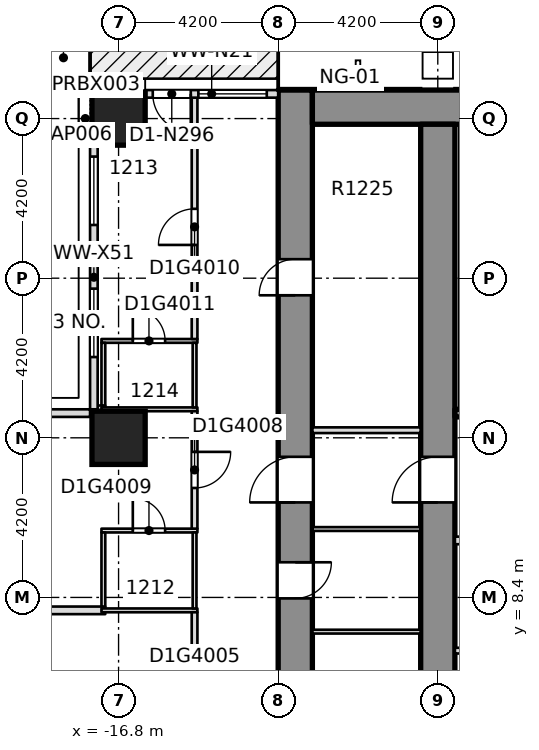
"""IFC4 building model, lengths in metres.
Left out: names, types, materials, properties, quantities, classifications, styles, units other than length and angle.
Written with IfcOpenShell. Run it as: python <this file> out.ifc"""

import sys

from ifc_helpers import new_model, si_unit, direction, frame, frame_2d, origin, origin_2d, place, context, subcontext, project, spatial, rectangle, extrude, element, fill, save


model = new_model("IFC4")
c1 = context("Model", 3, precision=1e-05, world=origin(), true_north=direction((0.0, 1.0)))
c2 = subcontext(c1, "Body", "Model", "MODEL_VIEW")
j1 = project(units=[si_unit("LENGTHUNIT", "METRE"), si_unit("PLANEANGLEUNIT", "RADIAN")], contexts=[c1])
p1 = place(None, origin())
s1 = spatial("IfcSite", under=j1, at=p1, CompositionType="ELEMENT")
p2 = place(p1, origin())
s2 = spatial("IfcBuilding", under=s1, at=p2, CompositionType="ELEMENT")
p3 = place(p2, frame((0.0, 0.0, 55.2)))
s3 = spatial("IfcBuildingStorey", under=s2, at=p3, CompositionType="ELEMENT", Elevation=55.2)
p4 = place(p3, frame((-12.15, -8.4, -0.32), z_axis=(0.0, 0.0, 1.0), x_axis=(0.0, 1.0, 0.0)))
e1 = element("IfcWall", 1, at=p4, inside=s3, PredefinedType="SHEAR", context=c2, shape_type="SweptSolid", body=[
    extrude(rectangle(XDim=30.15, YDim=0.9, at=frame_2d((15.075, 0.0))), origin(), (0.0, 0.0, 1.0), 3.45),
])
p5 = place(p4, frame((2.875, 0.0, 0.32)))
e2 = element("IfcOpeningElement", 2, at=p5, cuts=e1, PredefinedType="OPENING", context=c2, shape_type="SweptSolid", body=[
    extrude(rectangle(XDim=0.95, YDim=2.1, at=frame_2d((0.475, 1.05))), frame((0.0, 0.46, 0.0), z_axis=(0.0, -1.0, 0.0), x_axis=(1.0, 0.0, 0.0)), (0.0, 0.0, 1.0), 0.92),
])
p6 = place(p4, frame((6.575, 0.0, 0.32)))
e3 = element("IfcOpeningElement", 3, at=p6, cuts=e1, PredefinedType="OPENING", context=c2, shape_type="SweptSolid", body=[
    extrude(rectangle(XDim=0.95, YDim=2.1, at=frame_2d((0.475, 1.05))), frame((0.0, 0.46, 0.0), z_axis=(0.0, -1.0, 0.0), x_axis=(1.0, 0.0, 0.0)), (0.0, 0.0, 1.0), 0.92),
])
p7 = place(p4, frame((9.425, 0.0, 0.32)))
e4 = element("IfcOpeningElement", 4, at=p7, cuts=e1, PredefinedType="OPENING", context=c2, shape_type="SweptSolid", body=[
    extrude(rectangle(XDim=0.95, YDim=2.1, at=frame_2d((0.475, 1.05))), frame((0.0, 0.46, 0.0), z_axis=(0.0, -1.0, 0.0), x_axis=(1.0, 0.0, 0.0)), (0.0, 0.0, 1.0), 0.92),
])
p8 = place(p4, frame((13.225, 0.0, 0.32)))
e5 = element("IfcOpeningElement", 5, at=p8, cuts=e1, PredefinedType="OPENING", context=c2, shape_type="SweptSolid", body=[
    extrude(rectangle(XDim=0.95, YDim=2.1, at=frame_2d((0.475, 1.05))), frame((0.0, 0.46, 0.0), z_axis=(0.0, -1.0, 0.0), x_axis=(1.0, 0.0, 0.0)), (0.0, 0.0, 1.0), 0.92),
])
p9 = place(p4, frame((16.775, 0.0, 0.32)))
e6 = element("IfcOpeningElement", 6, at=p9, cuts=e1, PredefinedType="OPENING", context=c2, shape_type="SweptSolid", body=[
    extrude(rectangle(XDim=0.95, YDim=2.1, at=frame_2d((0.475, 1.05))), frame((0.0, 0.46, 0.0), z_axis=(0.0, -1.0, 0.0), x_axis=(1.0, 0.0, 0.0)), (0.0, 0.0, 1.0), 0.92),
])
p10 = place(p4, frame((24.75, 0.0, 0.32)))
e7 = element("IfcOpeningElement", 7, at=p10, cuts=e1, PredefinedType="OPENING", context=c2, shape_type="SweptSolid", body=[
    extrude(rectangle(XDim=0.95, YDim=2.1, at=frame_2d((0.475, 1.05))), frame((0.0, 0.46, 0.0), z_axis=(0.0, -1.0, 0.0), x_axis=(1.0, 0.0, 0.0)), (0.0, 0.0, 1.0), 0.92),
])
p11 = place(p4, frame((19.3, 0.0, 0.32)))
e8 = element("IfcOpeningElement", 8, at=p11, cuts=e1, PredefinedType="OPENING", context=c2, shape_type="SweptSolid", body=[
    extrude(rectangle(XDim=1.2, YDim=2.1, at=frame_2d((0.6, 1.05))), frame((0.0, 0.46, 0.0), z_axis=(0.0, -1.0, 0.0), x_axis=(1.0, 0.0, 0.0)), (0.0, 0.0, 1.0), 0.92),
])
p12 = place(p3, frame((-11.7, 21.3, -0.32), z_axis=(0.0, 0.0, 1.0), x_axis=(1.0, 0.0, 0.0)))
e9 = element("IfcWall", 9, at=p12, inside=s3, PredefinedType="SOLIDWALL", context=c2, shape_type="SweptSolid", body=[
    extrude(rectangle(XDim=23.4, YDim=0.9, at=frame_2d((11.7, 0.0))), origin(), (0.0, 0.0, 1.0), 3.45),
])
p13 = place(p3, frame((-8.4, -7.5, -0.32), z_axis=(0.0, 0.0, 1.0), x_axis=(0.0, 1.0, 0.0)))
e10 = element("IfcWall", 10, at=p13, inside=s3, PredefinedType="SHEAR", context=c2, shape_type="SweptSolid", body=[
    extrude(rectangle(XDim=28.35, YDim=0.9, at=frame_2d((14.175, 0.0))), origin(), (0.0, 0.0, 1.0), 3.45),
])
p14 = place(p13, frame((18.4, 0.0, 0.32)))
e11 = element("IfcOpeningElement", 11, at=p14, cuts=e10, PredefinedType="OPENING", context=c2, shape_type="SweptSolid", body=[
    extrude(rectangle(XDim=1.2, YDim=2.1, at=frame_2d((0.6, 1.05))), frame((0.0, 0.46, 0.0), z_axis=(0.0, -1.0, 0.0), x_axis=(1.0, 0.0, 0.0)), (0.0, 0.0, 1.0), 0.92),
])
for number, where, z_axis, x_axis in (
    (12, (-16.8, 12.6, -0.32), (0.0, 0.0, 1.0), (1.0, 0.0, 0.0)),
    (13, (-16.8, 21.0, -0.32), (0.0, 0.0, 1.0), (1.0, 0.0, 0.0)),
):
    element("IfcColumn", number, at=place(p3, frame(where, z_axis=z_axis, x_axis=x_axis)), inside=s3, PredefinedType="COLUMN", context=c2, shape_type="SweptSolid", body=[
        extrude(rectangle(XDim=1.4, YDim=1.4, at=origin_2d()), origin(), (0.0, 0.0, 1.0), 3.45),
    ])
p15 = place(p3, frame((-25.75, 8.06, 0.0), z_axis=(0.0, 0.0, 1.0), x_axis=(1.0, 0.0, 0.0)))
e14 = element("IfcWall", 14, at=p15, inside=s3, PredefinedType="PARTITIONING", context=c2, shape_type="SweptSolid", body=[
    extrude(rectangle(XDim=8.6, YDim=0.2, at=frame_2d((4.3, 0.0))), origin(), (0.0, 0.0, 1.0), 3.13),
])
p16 = place(p3, frame((-17.25, 8.06, 0.0), z_axis=(0.0, 0.0, 1.0), x_axis=(1.0, 0.0, 0.0)))
e15 = element("IfcWall", 15, at=p16, inside=s3, PredefinedType="PARTITIONING", context=c2, shape_type="SweptSolid", body=[
    extrude(rectangle(XDim=2.525, YDim=0.1, at=frame_2d((1.262, 0.0))), origin(), (0.0, 0.0, 1.0), 3.13),
])
p17 = place(p3, frame((-17.25, 10.16, 0.0), z_axis=(0.0, 0.0, 1.0), x_axis=(1.0, 0.0, 0.0)))
e16 = element("IfcWall", 16, at=p17, inside=s3, PredefinedType="PARTITIONING", context=c2, shape_type="SweptSolid", body=[
    extrude(rectangle(XDim=2.525, YDim=0.1, at=frame_2d((1.262, 0.0))), origin(), (0.0, 0.0, 1.0), 3.13),
])
p18 = place(p17, frame((0.825, 0.0, 0.0)))
e17 = element("IfcOpeningElement", 17, at=p18, cuts=e16, PredefinedType="OPENING", context=c2, shape_type="SweptSolid", body=[
    extrude(rectangle(XDim=0.85, YDim=2.1, at=frame_2d((0.425, 1.05))), frame((0.0, 0.06, 0.0), z_axis=(0.0, -1.0, 0.0), x_axis=(1.0, 0.0, 0.0)), (0.0, 0.0, 1.0), 0.12),
])
p19 = place(p3, frame((-17.35, 13.35, 0.0), z_axis=(0.0, 0.0, 1.0), x_axis=(1.0, 0.0, 0.0)))
e18 = element("IfcWall", 18, at=p19, inside=s3, PredefinedType="PARTITIONING", context=c2, shape_type="SweptSolid", body=[
    extrude(rectangle(XDim=0.2, YDim=0.2, at=frame_2d((0.1, 0.0))), origin(), (0.0, 0.0, 1.0), 3.13),
])
p20 = place(p3, frame((-17.25, 13.35, 0.0), z_axis=(0.0, 0.0, 1.0), x_axis=(1.0, 0.0, 0.0)))
e19 = element("IfcWall", 19, at=p20, inside=s3, PredefinedType="PARTITIONING", context=c2, shape_type="SweptSolid", body=[
    extrude(rectangle(XDim=2.525, YDim=0.1, at=frame_2d((1.262, 0.0))), origin(), (0.0, 0.0, 1.0), 3.13),
])
p21 = place(p3, frame((-17.25, 15.15, 0.0), z_axis=(0.0, 0.0, 1.0), x_axis=(1.0, 0.0, 0.0)))
e20 = element("IfcWall", 20, at=p21, inside=s3, PredefinedType="PARTITIONING", context=c2, shape_type="SweptSolid", body=[
    extrude(rectangle(XDim=2.525, YDim=0.1, at=frame_2d((1.262, 0.0))), origin(), (0.0, 0.0, 1.0), 3.13),
])
p22 = place(p21, frame((0.825, 0.0, 0.0)))
e21 = element("IfcOpeningElement", 21, at=p22, cuts=e20, PredefinedType="OPENING", context=c2, shape_type="SweptSolid", body=[
    extrude(rectangle(XDim=0.85, YDim=2.1, at=frame_2d((0.425, 1.05))), frame((0.0, 0.06, 0.0), z_axis=(0.0, -1.0, 0.0), x_axis=(1.0, 0.0, 0.0)), (0.0, 0.0, 1.0), 0.12),
])
p23 = place(p3, frame((-17.2, 8.16, 0.0), z_axis=(0.0, 0.0, 1.0), x_axis=(0.0, 1.0, 0.0)))
e22 = element("IfcWall", 22, at=p23, inside=s3, PredefinedType="PARTITIONING", context=c2, shape_type="SweptSolid", body=[
    extrude(rectangle(XDim=1.95, YDim=0.1, at=frame_2d((0.975, 0.0))), origin(), (0.0, 0.0, 1.0), 3.13),
])
p24 = place(p3, frame((-17.2, 13.45, 0.0), z_axis=(0.0, 0.0, 1.0), x_axis=(0.0, 1.0, 0.0)))
e23 = element("IfcWall", 23, at=p24, inside=s3, PredefinedType="PARTITIONING", context=c2, shape_type="SweptSolid", body=[
    extrude(rectangle(XDim=1.65, YDim=0.1, at=frame_2d((0.825, 0.0))), origin(), (0.0, 0.0, 1.0), 3.13),
])
p25 = place(p3, frame((-14.8, -10.525, 0.0), z_axis=(0.0, 0.0, 1.0), x_axis=(0.0, 1.0, 0.0)))
e24 = element("IfcWall", 24, at=p25, inside=s3, PredefinedType="PARTITIONING", context=c2, shape_type="SweptSolid", body=[
    extrude(rectangle(XDim=18.535, YDim=0.15, at=frame_2d((9.268, 0.0))), origin(), (0.0, 0.0, 1.0), 3.13),
])
p26 = place(p25, frame((0.925, 0.0, 0.0)))
e25 = element("IfcOpeningElement", 25, at=p26, cuts=e24, PredefinedType="OPENING", context=c2, shape_type="SweptSolid", body=[
    extrude(rectangle(XDim=1.0, YDim=2.1, at=frame_2d((0.5, 1.05))), frame((0.0, 0.085, 0.0), z_axis=(0.0, -1.0, 0.0), x_axis=(1.0, 0.0, 0.0)), (0.0, 0.0, 1.0), 0.17),
])
p27 = place(p25, frame((15.755, 0.0, 0.0)))
e26 = element("IfcOpeningElement", 26, at=p27, cuts=e24, PredefinedType="OPENING", context=c2, shape_type="SweptSolid", body=[
    extrude(rectangle(XDim=1.0, YDim=2.1, at=frame_2d((0.5, 1.05))), frame((0.0, 0.085, 0.0), z_axis=(0.0, -1.0, 0.0), x_axis=(1.0, 0.0, 0.0)), (0.0, 0.0, 1.0), 0.17),
])
p28 = place(p25, frame((9.975, 0.0, 0.0)))
e27 = element("IfcOpeningElement", 27, at=p28, cuts=e24, PredefinedType="OPENING", context=c2, shape_type="SweptSolid", body=[
    extrude(rectangle(XDim=1.1, YDim=2.1, at=frame_2d((0.55, 1.05))), frame((0.0, 0.085, 0.0), z_axis=(0.0, -1.0, 0.0), x_axis=(1.0, 0.0, 0.0)), (0.0, 0.0, 1.0), 0.17),
])
p29 = place(p25, frame((4.725, 0.0, 0.0)))
e28 = element("IfcOpeningElement", 28, at=p29, cuts=e24, PredefinedType="OPENING", context=c2, shape_type="SweptSolid", body=[
    extrude(rectangle(XDim=1.0, YDim=2.1, at=frame_2d((0.5, 1.05))), frame((0.0, 0.085, 0.0), z_axis=(0.0, -1.0, 0.0), x_axis=(1.0, 0.0, 0.0)), (0.0, 0.0, 1.0), 0.17),
])
p30 = place(p3, frame((-14.8, 8.11, 0.0), z_axis=(0.0, 0.0, 1.0), x_axis=(0.0, 1.0, 0.0)))
e29 = element("IfcWall", 29, at=p30, inside=s3, PredefinedType="PARTITIONING", context=c2, shape_type="SweptSolid", body=[
    extrude(rectangle(XDim=2.0, YDim=0.1, at=frame_2d((1.0, 0.0))), origin(), (0.0, 0.0, 1.0), 3.13),
])
p31 = place(p3, frame((-14.8, 10.21, 0.0), z_axis=(0.0, 0.0, 1.0), x_axis=(0.0, 1.0, 0.0)))
e30 = element("IfcWall", 30, at=p31, inside=s3, PredefinedType="PARTITIONING", context=c2, shape_type="SweptSolid", body=[
    extrude(rectangle(XDim=3.09, YDim=0.15, at=frame_2d((1.545, 0.0))), origin(), (0.0, 0.0, 1.0), 3.13),
])
p32 = place(p31, frame((1.07, 0.0, 0.0)))
e31 = element("IfcOpeningElement", 31, at=p32, cuts=e30, PredefinedType="OPENING", context=c2, shape_type="SweptSolid", body=[
    extrude(rectangle(XDim=0.95, YDim=2.1, at=frame_2d((0.475, 1.05))), frame((0.0, 0.085, 0.0), z_axis=(0.0, -1.0, 0.0), x_axis=(1.0, 0.0, 0.0)), (0.0, 0.0, 1.0), 0.17),
])
p33 = place(p3, frame((-14.8, 13.4, 0.0), z_axis=(0.0, 0.0, 1.0), x_axis=(0.0, 1.0, 0.0)))
e32 = element("IfcWall", 32, at=p33, inside=s3, PredefinedType="PARTITIONING", context=c2, shape_type="SweptSolid", body=[
    extrude(rectangle(XDim=1.7, YDim=0.1, at=frame_2d((0.85, 0.0))), origin(), (0.0, 0.0, 1.0), 3.13),
])
p34 = place(p3, frame((-14.8, 15.2, 0.0), z_axis=(0.0, 0.0, 1.0), x_axis=(0.0, 1.0, 0.0)))
e33 = element("IfcWall", 33, at=p34, inside=s3, PredefinedType="PARTITIONING", context=c2, shape_type="SweptSolid", body=[
    extrude(rectangle(XDim=6.35, YDim=0.15, at=frame_2d((3.175, 0.0))), origin(), (0.0, 0.0, 1.0), 3.13),
])
p35 = place(p34, frame((2.475, 0.0, 0.0)))
e34 = element("IfcOpeningElement", 34, at=p35, cuts=e33, PredefinedType="OPENING", context=c2, shape_type="SweptSolid", body=[
    extrude(rectangle(XDim=0.95, YDim=2.1, at=frame_2d((0.475, 1.05))), frame((0.0, 0.085, 0.0), z_axis=(0.0, -1.0, 0.0), x_axis=(1.0, 0.0, 0.0)), (0.0, 0.0, 1.0), 0.17),
])
p36 = place(p3, frame((-12.6, 21.65, 0.0), z_axis=(0.0, 0.0, 1.0), x_axis=(-1.0, 0.0, 0.0)))
e35 = element("IfcWall", 35, at=p36, inside=s3, PredefinedType="STANDARD", context=c2, shape_type="SweptSolid", body=[
    extrude(rectangle(XDim=3.5, YDim=0.2, at=frame_2d((1.75, 0.0))), origin(), (0.0, 0.0, 1.0), 3.13),
])
p37 = place(p36, frame((0.3, 0.0, 0.2)))
e36 = element("IfcOpeningElement", 36, at=p37, cuts=e35, PredefinedType="OPENING", context=c2, shape_type="SweptSolid", body=[
    extrude(rectangle(XDim=1.8, YDim=2.65, at=frame_2d((0.9, 1.325))), frame((0.0, 0.11, 0.0), z_axis=(0.0, -1.0, 0.0), x_axis=(1.0, 0.0, 0.0)), (0.0, 0.0, 1.0), 0.22),
])
p38 = place(p36, frame((2.3, 0.0, 0.0)))
e37 = element("IfcOpeningElement", 37, at=p38, cuts=e35, PredefinedType="OPENING", context=c2, shape_type="SweptSolid", body=[
    extrude(rectangle(XDim=1.0, YDim=2.4, at=frame_2d((0.5, 1.2))), frame((0.0, 0.11, 0.0), z_axis=(0.0, -1.0, 0.0), x_axis=(1.0, 0.0, 0.0)), (0.0, 0.0, 1.0), 0.22),
])
p39 = place(p3, frame((-17.45, 20.3, 0.0), z_axis=(0.0, 0.0, 1.0), x_axis=(0.0, -1.0, 0.0)))
e38 = element("IfcWall", 38, at=p39, inside=s3, PredefinedType="STANDARD", context=c2, shape_type="SweptSolid", body=[
    extrude(rectangle(XDim=6.95, YDim=0.2, at=frame_2d((3.475, 0.0))), origin(), (0.0, 0.0, 1.0), 3.13),
])
p40 = place(p39, frame((3.775, 0.0, 0.2)))
e39 = element("IfcOpeningElement", 39, at=p40, cuts=e38, PredefinedType="OPENING", context=c2, shape_type="SweptSolid", body=[
    extrude(rectangle(XDim=1.8, YDim=2.65, at=frame_2d((0.9, 1.325))), frame((0.0, 0.11, 0.0), z_axis=(0.0, -1.0, 0.0), x_axis=(1.0, 0.0, 0.0)), (0.0, 0.0, 1.0), 0.22),
])
p41 = place(p39, frame((0.3, 0.0, 0.2)))
e40 = element("IfcOpeningElement", 40, at=p41, cuts=e38, PredefinedType="OPENING", context=c2, shape_type="SweptSolid", body=[
    extrude(rectangle(XDim=1.8, YDim=2.65, at=frame_2d((0.9, 1.325))), frame((0.0, 0.11, 0.0), z_axis=(0.0, -1.0, 0.0), x_axis=(1.0, 0.0, 0.0)), (0.0, 0.0, 1.0), 0.22),
])
p42 = place(p3, frame((-17.55, 13.25, 0.0), z_axis=(0.0, 0.0, 1.0), x_axis=(-1.0, 0.0, 0.0)))
e41 = element("IfcWall", 41, at=p42, inside=s3, PredefinedType="STANDARD", context=c2, shape_type="SweptSolid", body=[
    extrude(rectangle(XDim=6.95, YDim=0.2, at=frame_2d((3.475, 0.0))), origin(), (0.0, 0.0, 1.0), 3.13),
])
p43 = place(p3, frame((-7.949, 7.0, 0.0), z_axis=(0.0, 0.0, 1.0), x_axis=(1.0, 0.0, 0.0)))
e42 = element("IfcWall", 42, at=p43, inside=s3, PredefinedType="PARTITIONING", context=c2, shape_type="SweptSolid", body=[
    extrude(rectangle(XDim=15.898, YDim=0.15, at=frame_2d((7.949, 0.0))), origin(), (0.0, 0.0, 1.0), 3.13),
])
p44 = place(p43, frame((7.249, 0.0, 0.0)))
e43 = element("IfcOpeningElement", 43, at=p44, cuts=e42, PredefinedType="OPENING", context=c2, shape_type="SweptSolid", body=[
    extrude(rectangle(XDim=1.4, YDim=2.1, at=frame_2d((0.7, 1.05))), frame((0.0, 0.085, 0.0), z_axis=(0.0, -1.0, 0.0), x_axis=(1.0, 0.0, 0.0)), (0.0, 0.0, 1.0), 0.17),
])
p45 = place(p3, frame((-7.949, 9.9, 0.0), z_axis=(0.0, 0.0, 1.0), x_axis=(1.0, 0.0, 0.0)))
e44 = element("IfcWall", 44, at=p45, inside=s3, PredefinedType="PARTITIONING", context=c2, shape_type="SweptSolid", body=[
    extrude(rectangle(XDim=4.349, YDim=0.2, at=frame_2d((2.174, 0.0))), origin(), (0.0, 0.0, 1.0), 3.13),
])
p46 = place(p45, frame((0.999, 0.0, 0.0)))
e45 = element("IfcOpeningElement", 45, at=p46, cuts=e44, PredefinedType="OPENING", context=c2, shape_type="SweptSolid", body=[
    extrude(rectangle(XDim=1.1, YDim=2.1, at=frame_2d((0.55, 1.05))), frame((0.0, 0.11, 0.0), z_axis=(0.0, -1.0, 0.0), x_axis=(1.0, 0.0, 0.0)), (0.0, 0.0, 1.0), 0.22),
])
p47 = place(p3, frame((-7.949, 13.25, 0.0), z_axis=(0.0, 0.0, 1.0), x_axis=(1.0, 0.0, 0.0)))
e46 = element("IfcWall", 46, at=p47, inside=s3, PredefinedType="SOLIDWALL", context=c2, shape_type="SweptSolid", body=[
    extrude(rectangle(XDim=4.524, YDim=0.2, at=frame_2d((2.262, 0.0))), origin(), (0.0, 0.0, 1.0), 3.13),
])
p48 = place(p47, frame((1.499, 0.0, 0.0)))
e47 = element("IfcOpeningElement", 47, at=p48, cuts=e46, PredefinedType="OPENING", context=c2, shape_type="SweptSolid", body=[
    extrude(rectangle(XDim=1.2, YDim=2.1, at=frame_2d((0.6, 1.05))), frame((0.0, 0.11, 0.0), z_axis=(0.0, -1.0, 0.0), x_axis=(1.0, 0.0, 0.0)), (0.0, 0.0, 1.0), 0.22),
])
for number, where, z_axis, x_axis in (
    (48, (-11.699, 7.5, 0.0), (0.0, 0.0, 1.0), (1.0, 0.0, 0.0)),
    (49, (-11.699, 10.2, 0.0), (0.0, 0.0, 1.0), (1.0, 0.0, 0.0)),
):
    element("IfcWall", number, at=place(p3, frame(where, z_axis=z_axis, x_axis=x_axis)), inside=s3, PredefinedType="PARTITIONING", context=c2, shape_type="SweptSolid", body=[
        extrude(rectangle(XDim=2.848, YDim=0.1, at=frame_2d((1.424, 0.0))), origin(), (0.0, 0.0, 1.0), 3.13),
    ])
p49 = place(p3, frame((-11.699, 12.8, 0.0), z_axis=(0.0, 0.0, 1.0), x_axis=(1.0, 0.0, 0.0)))
e50 = element("IfcWall", 50, at=p49, inside=s3, PredefinedType="PARTITIONING", context=c2, shape_type="SweptSolid", body=[
    extrude(rectangle(XDim=2.848, YDim=0.15, at=frame_2d((1.424, 0.0))), origin(), (0.0, 0.0, 1.0), 3.13),
])
p50 = place(p32, origin())
e51 = element("IfcDoor", 51, at=p50, inside=s3, OperationType="SINGLE_SWING_LEFT", PredefinedType="DOOR", context=c2, shape_type="SweptSolid", body=[
    extrude(rectangle(XDim=0.95, YDim=2.1, at=frame_2d((0.475, 1.05))), frame((0.0, 0.025, 0.0), z_axis=(0.0, -1.0, 0.0), x_axis=(1.0, 0.0, 0.0)), (0.0, 0.0, 1.0), 0.05),
])
fill(e31, e51)
p51 = place(p18, origin())
e52 = element("IfcDoor", 52, at=p51, inside=s3, OperationType="SINGLE_SWING_RIGHT", PredefinedType="DOOR", context=c2, shape_type="SweptSolid", body=[
    extrude(rectangle(XDim=0.85, YDim=2.1, at=frame_2d((0.425, 1.05))), frame((0.0, 0.025, 0.0), z_axis=(0.0, -1.0, 0.0), x_axis=(1.0, 0.0, 0.0)), (0.0, 0.0, 1.0), 0.05),
])
fill(e17, e52)
p52 = place(p35, origin())
e53 = element("IfcDoor", 53, at=p52, inside=s3, OperationType="SINGLE_SWING_RIGHT", PredefinedType="DOOR", context=c2, shape_type="SweptSolid", body=[
    extrude(rectangle(XDim=0.95, YDim=2.1, at=frame_2d((0.475, 1.05))), frame((0.0, 0.025, 0.0), z_axis=(0.0, -1.0, 0.0), x_axis=(1.0, 0.0, 0.0)), (0.0, 0.0, 1.0), 0.05),
])
fill(e34, e53)
p53 = place(p22, origin())
e54 = element("IfcDoor", 54, at=p53, inside=s3, OperationType="SINGLE_SWING_RIGHT", PredefinedType="DOOR", context=c2, shape_type="SweptSolid", body=[
    extrude(rectangle(XDim=0.85, YDim=2.1, at=frame_2d((0.425, 1.05))), frame((0.0, 0.025, 0.0), z_axis=(0.0, -1.0, 0.0), x_axis=(1.0, 0.0, 0.0)), (0.0, 0.0, 1.0), 0.05),
])
fill(e21, e54)
p54 = place(p37, origin())
e55 = element("IfcWindow", 55, at=p54, inside=s3, PartitioningType="SINGLE_PANEL", PredefinedType="WINDOW", context=c2, shape_type="SweptSolid", body=[
    extrude(rectangle(XDim=1.8, YDim=2.65, at=frame_2d((0.9, 1.325))), frame((0.0, 0.03, 0.0), z_axis=(0.0, -1.0, 0.0), x_axis=(1.0, 0.0, 0.0)), (0.0, 0.0, 1.0), 0.06),
])
fill(e36, e55)
p55 = place(p38, origin())
e56 = element("IfcDoor", 56, at=p55, inside=s3, OperationType="SINGLE_SWING_LEFT", PredefinedType="DOOR", context=c2, shape_type="SweptSolid", body=[
    extrude(rectangle(XDim=1.0, YDim=2.4, at=frame_2d((0.5, 1.2))), frame((0.0, 0.025, 0.0), z_axis=(0.0, -1.0, 0.0), x_axis=(1.0, 0.0, 0.0)), (0.0, 0.0, 1.0), 0.05),
])
fill(e37, e56)
p56 = place(p40, origin())
e57 = element("IfcWindow", 57, at=p56, inside=s3, PartitioningType="SINGLE_PANEL", PredefinedType="WINDOW", context=c2, shape_type="SweptSolid", body=[
    extrude(rectangle(XDim=1.8, YDim=2.65, at=frame_2d((0.9, 1.325))), frame((0.0, 0.03, 0.0), z_axis=(0.0, -1.0, 0.0), x_axis=(1.0, 0.0, 0.0)), (0.0, 0.0, 1.0), 0.06),
])
fill(e39, e57)
p57 = place(p41, origin())
e58 = element("IfcWindow", 58, at=p57, inside=s3, PartitioningType="SINGLE_PANEL", PredefinedType="WINDOW", context=c2, shape_type="SweptSolid", body=[
    extrude(rectangle(XDim=1.8, YDim=2.65, at=frame_2d((0.9, 1.325))), frame((0.0, 0.03, 0.0), z_axis=(0.0, -1.0, 0.0), x_axis=(1.0, 0.0, 0.0)), (0.0, 0.0, 1.0), 0.06),
])
fill(e40, e58)
p58 = place(p9, origin())
e59 = element("IfcDoor", 59, at=p58, inside=s3, OperationType="SINGLE_SWING_LEFT", PredefinedType="DOOR", context=c2, shape_type="SweptSolid", body=[
    extrude(rectangle(XDim=0.95, YDim=2.1, at=frame_2d((0.475, 1.05))), frame((0.0, 0.025, 0.0), z_axis=(0.0, -1.0, 0.0), x_axis=(1.0, 0.0, 0.0)), (0.0, 0.0, 1.0), 0.05),
])
fill(e6, e59)
p59 = place(p10, origin())
e60 = element("IfcDoor", 60, at=p59, inside=s3, OperationType="SINGLE_SWING_LEFT", PredefinedType="DOOR", context=c2, shape_type="SweptSolid", body=[
    extrude(rectangle(XDim=0.95, YDim=2.1, at=frame_2d((0.475, 1.05))), frame((0.0, 0.025, 0.0), z_axis=(0.0, -1.0, 0.0), x_axis=(1.0, 0.0, 0.0)), (0.0, 0.0, 1.0), 0.05),
])
fill(e7, e60)
p60 = place(p11, origin())
e61 = element("IfcDoor", 61, at=p60, inside=s3, OperationType="SINGLE_SWING_LEFT", PredefinedType="DOOR", context=c2, shape_type="SweptSolid", body=[
    extrude(rectangle(XDim=1.2, YDim=2.1, at=frame_2d((0.6, 1.05))), frame((0.0, 0.025, 0.0), z_axis=(0.0, -1.0, 0.0), x_axis=(1.0, 0.0, 0.0)), (0.0, 0.0, 1.0), 0.05),
])
fill(e8, e61)
p61 = place(p14, origin())
e62 = element("IfcDoor", 62, at=p61, inside=s3, OperationType="SINGLE_SWING_LEFT", PredefinedType="DOOR", context=c2, shape_type="SweptSolid", body=[
    extrude(rectangle(XDim=1.2, YDim=2.1, at=frame_2d((0.6, 1.05))), frame((0.0, 0.025, 0.0), z_axis=(0.0, -1.0, 0.0), x_axis=(1.0, 0.0, 0.0)), (0.0, 0.0, 1.0), 0.05),
])
fill(e11, e62)
save(model, sys.argv[1])
